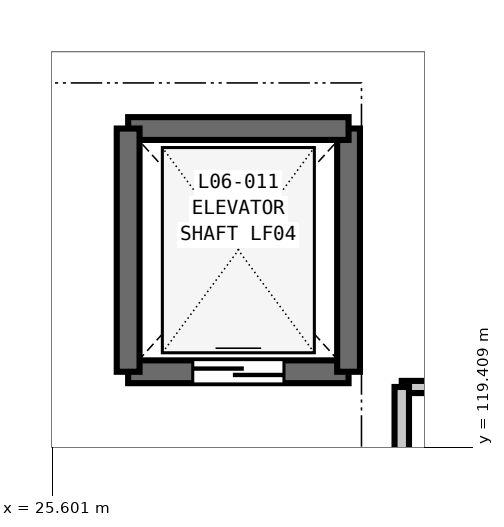
"""IFC4 building model, lengths in metres.
Left out: names, types, materials, properties, quantities, classifications, styles, units other than length and angle.
Written with IfcOpenShell. Run it as: python <this file> out.ifc"""

import sys

from ifc_helpers import new_model, si_unit, direction, frame, frame_2d, origin, place, context, subcontext, project, spatial, rectangle, extrude, element, fill, save


model = new_model("IFC4")
c1 = context("Model", 3, precision=1e-05, world=origin(), true_north=direction((0.0, 1.0)))
c2 = subcontext(c1, "Body", "Model", "MODEL_VIEW")
j1 = project(units=[si_unit("LENGTHUNIT", "METRE"), si_unit("PLANEANGLEUNIT", "RADIAN")], contexts=[c1])
p1 = place(None, origin())
s1 = spatial("IfcSite", under=j1, at=p1, CompositionType="ELEMENT")
p2 = place(p1, origin())
s2 = spatial("IfcBuilding", under=s1, at=p2, CompositionType="ELEMENT")
p3 = place(p2, frame((0.0, 0.0, 28.8)))
s3 = spatial("IfcBuildingStorey", under=s2, at=p3, CompositionType="ELEMENT", Elevation=28.8)
p4 = place(p3, frame((26.6, 120.4, 0.0), z_axis=(0.0, 0.0, 1.0), x_axis=(1.0, 0.0, 0.0)))
e1 = element("IfcWall", 1, at=p4, inside=s3, PredefinedType="SHEAR", context=c2, shape_type="SweptSolid", body=[
    extrude(rectangle(XDim=2.9, YDim=0.3, at=frame_2d((1.45, 0.0))), origin(), (0.0, 0.0, 1.0), 4.2),
])
p5 = place(p4, frame((0.85, 0.0, 0.0)))
e2 = element("IfcOpeningElement", 2, at=p5, cuts=e1, PredefinedType="OPENING", context=c2, shape_type="SweptSolid", body=[
    extrude(rectangle(XDim=1.2, YDim=2.2, at=frame_2d((0.6, 1.1))), frame((0.0, 0.16, 0.0), z_axis=(0.0, -1.0, 0.0), x_axis=(1.0, 0.0, 0.0)), (0.0, 0.0, 1.0), 0.32),
])
p6 = place(p3, frame((29.5, 120.4, 0.0), z_axis=(0.0, 0.0, 1.0), x_axis=(0.0, 1.0, 0.0)))
e3 = element("IfcWall", 3, at=p6, inside=s3, PredefinedType="SHEAR", context=c2, shape_type="SweptSolid", body=[
    extrude(rectangle(XDim=3.2, YDim=0.3, at=frame_2d((1.6, 0.0))), origin(), (0.0, 0.0, 1.0), 4.2),
])
p7 = place(p3, frame((29.5, 123.6, 0.0), z_axis=(0.0, 0.0, 1.0), x_axis=(-1.0, 0.0, 0.0)))
e4 = element("IfcWall", 4, at=p7, inside=s3, PredefinedType="SHEAR", context=c2, shape_type="SweptSolid", body=[
    extrude(rectangle(XDim=2.9, YDim=0.3, at=frame_2d((1.45, 0.0))), origin(), (0.0, 0.0, 1.0), 4.2),
])
p8 = place(p3, frame((26.6, 123.6, 0.0), z_axis=(0.0, 0.0, 1.0), x_axis=(0.0, -1.0, 0.0)))
e5 = element("IfcWall", 5, at=p8, inside=s3, PredefinedType="SHEAR", context=c2, shape_type="SweptSolid", body=[
    extrude(rectangle(XDim=3.2, YDim=0.3, at=frame_2d((1.6, 0.0))), origin(), (0.0, 0.0, 1.0), 4.2),
])
p9 = place(p3, frame((30.2, 120.2, 0.0), z_axis=(0.0, 0.0, 1.0), x_axis=(1.0, 0.0, 0.0)))
e6 = element("IfcWall", 6, at=p9, inside=s3, PredefinedType="PLUMBINGWALL", context=c2, shape_type="SweptSolid", body=[
    extrude(rectangle(XDim=3.4, YDim=0.16, at=frame_2d((1.7, 0.0))), origin(), (0.0, 0.0, 1.0), 3.92),
])
p10 = place(p3, frame((30.2, 116.0, 0.0), z_axis=(0.0, 0.0, 1.0), x_axis=(0.0, 1.0, 0.0)))
e7 = element("IfcWall", 7, at=p10, inside=s3, PredefinedType="PLUMBINGWALL", context=c2, shape_type="SweptSolid", body=[
    extrude(rectangle(XDim=4.2, YDim=0.19, at=frame_2d((2.1, 0.0))), origin(), (0.0, 0.0, 1.0), 3.92),
])
p11 = place(p5, origin())
e8 = element("IfcDoor", 8, at=p11, inside=s3, OperationType="DOUBLE_DOOR_SLIDING", PredefinedType="DOOR", context=c2, shape_type="SweptSolid", body=[
    extrude(rectangle(XDim=1.2, YDim=2.2, at=frame_2d((0.6, 1.1))), frame((0.0, 0.025, 0.0), z_axis=(0.0, -1.0, 0.0), x_axis=(1.0, 0.0, 0.0)), (0.0, 0.0, 1.0), 0.05),
])
fill(e2, e8)
save(model, sys.argv[1])
